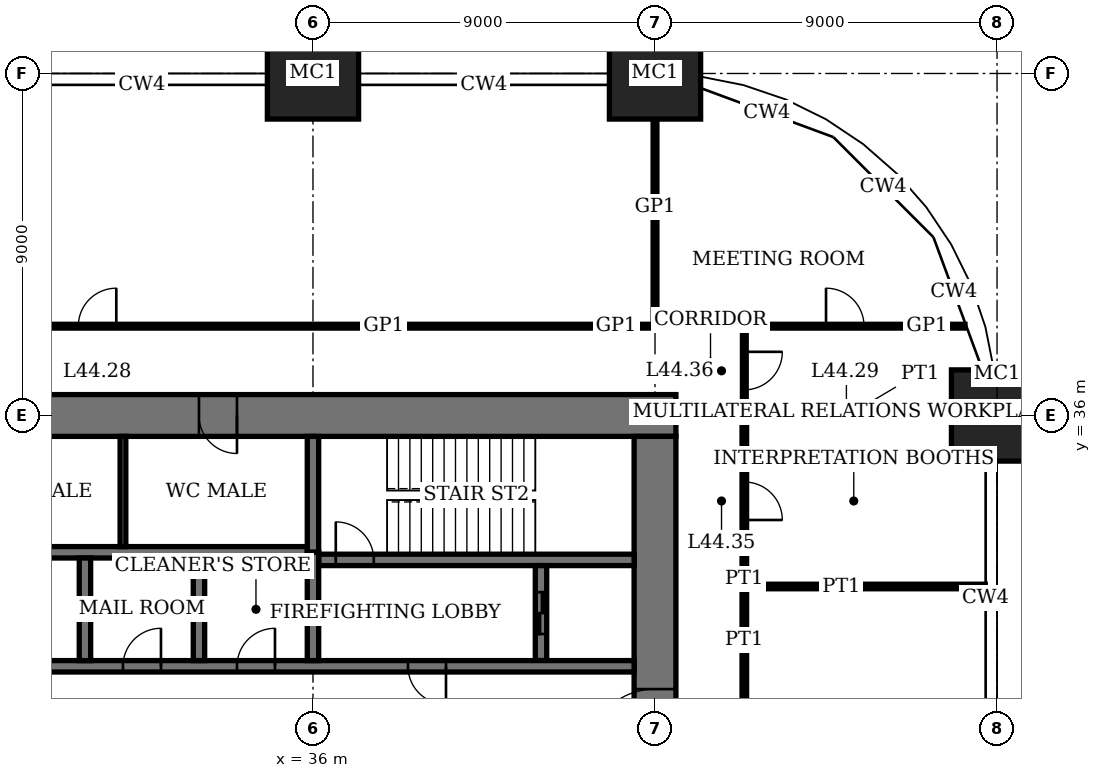
"""IFC4 building model, lengths in metres.
Left out: names, types, materials, properties, quantities, classifications, styles, units other than length and angle.
Written with IfcOpenShell. Run it as: python <this file> out.ifc"""

import sys

from ifc_helpers import new_model, si_unit, direction, frame, frame_2d, origin, origin_2d, place, context, subcontext, project, spatial, rectangle, extrude, element, fill, save


model = new_model("IFC4")
c1 = context("Model", 3, precision=1e-05, world=origin(), true_north=direction((0.0, 1.0)))
c2 = subcontext(c1, "Body", "Model", "MODEL_VIEW")
j1 = project(units=[si_unit("LENGTHUNIT", "METRE"), si_unit("PLANEANGLEUNIT", "RADIAN")], contexts=[c1])
p1 = place(None, origin())
s1 = spatial("IfcSite", under=j1, at=p1, CompositionType="ELEMENT")
p2 = place(p1, origin())
s2 = spatial("IfcBuilding", under=s1, at=p2, CompositionType="ELEMENT")
p3 = place(p2, frame((0.0, 0.0, 182.2)))
s3 = spatial("IfcBuildingStorey", under=s2, at=p3, CompositionType="ELEMENT", Elevation=182.2)
for number, where, z_axis, x_axis in (
    (1, (36.0, 45.0, 0.0), (0.0, 0.0, 1.0), (1.0, 0.0, 0.0)),
    (2, (45.0, 45.0, 0.0), (0.0, 0.0, 1.0), (1.0, 0.0, 0.0)),
    (3, (54.0, 36.0, 0.0), (0.0, 0.0, 1.0), (1.0, 0.0, 0.0)),
):
    element("IfcColumn", number, at=place(p3, frame(where, z_axis=z_axis, x_axis=x_axis)), inside=s3, PredefinedType="COLUMN", context=c2, shape_type="SweptSolid", body=[
        extrude(rectangle(XDim=2.4, YDim=2.4, at=origin_2d()), origin(), (0.0, 0.0, 1.0), 4.0),
    ])
p4 = place(p3, frame((45.55, 36.0, 0.0), z_axis=(0.0, 0.0, 1.0), x_axis=(-1.0, 0.0, 0.0)))
e4 = element("IfcWall", 4, at=p4, inside=s3, PredefinedType="SHEAR", context=c2, shape_type="SweptSolid", body=[
    extrude(rectangle(XDim=28.1, YDim=1.1, at=frame_2d((14.05, 0.0))), origin(), (0.0, 0.0, 1.0), 4.0),
])
p5 = place(p4, frame((11.55, 0.0, 0.0)))
e5 = element("IfcOpeningElement", 5, at=p5, cuts=e4, PredefinedType="OPENING", context=c2, shape_type="SweptSolid", body=[
    extrude(rectangle(XDim=1.0, YDim=2.4, at=frame_2d((0.5, 1.2))), frame((0.0, 0.56, 0.0), z_axis=(0.0, -1.0, 0.0), x_axis=(1.0, 0.0, 0.0)), (0.0, 0.0, 1.0), 1.12),
])
p6 = place(p4, frame((16.55, 0.0, 0.0)))
e6 = element("IfcOpeningElement", 6, at=p6, cuts=e4, PredefinedType="OPENING", context=c2, shape_type="SweptSolid", body=[
    extrude(rectangle(XDim=1.0, YDim=2.4, at=frame_2d((0.5, 1.2))), frame((0.0, 0.56, 0.0), z_axis=(0.0, -1.0, 0.0), x_axis=(1.0, 0.0, 0.0)), (0.0, 0.0, 1.0), 1.12),
])
p7 = place(p4, frame((20.0, 0.0, 0.0)))
e7 = element("IfcOpeningElement", 7, at=p7, cuts=e4, PredefinedType="OPENING", context=c2, shape_type="SweptSolid", body=[
    extrude(rectangle(XDim=1.1, YDim=2.4, at=frame_2d((0.55, 1.2))), frame((0.0, 0.56, 0.0), z_axis=(0.0, -1.0, 0.0), x_axis=(1.0, 0.0, 0.0)), (0.0, 0.0, 1.0), 1.12),
])
p8 = place(p4, frame((24.05, 0.0, 0.0)))
e8 = element("IfcOpeningElement", 8, at=p8, cuts=e4, PredefinedType="OPENING", context=c2, shape_type="SweptSolid", body=[
    extrude(rectangle(XDim=1.0, YDim=2.4, at=frame_2d((0.5, 1.2))), frame((0.0, 0.56, 0.0), z_axis=(0.0, -1.0, 0.0), x_axis=(1.0, 0.0, 0.0)), (0.0, 0.0, 1.0), 1.12),
])
p9 = place(p3, frame((45.0, 18.55, 0.0), z_axis=(0.0, 0.0, 1.0), x_axis=(0.0, 1.0, 0.0)))
e9 = element("IfcWall", 9, at=p9, inside=s3, PredefinedType="SHEAR", context=c2, shape_type="SweptSolid", body=[
    extrude(rectangle(XDim=16.9, YDim=1.1, at=frame_2d((8.45, 0.0))), origin(), (0.0, 0.0, 1.0), 4.0),
])
p10 = place(p9, frame((8.45, 0.0, 0.0)))
e10 = element("IfcOpeningElement", 10, at=p10, cuts=e9, PredefinedType="OPENING", context=c2, shape_type="SweptSolid", body=[
    extrude(rectangle(XDim=1.8, YDim=2.4, at=frame_2d((0.9, 1.2))), frame((0.0, 0.56, 0.0), z_axis=(0.0, -1.0, 0.0), x_axis=(1.0, 0.0, 0.0)), (0.0, 0.0, 1.0), 1.12),
])
p11 = place(p3, frame((36.15, 32.2, 0.0), z_axis=(0.0, 0.0, 1.0), x_axis=(1.0, 0.0, 0.0)))
e11 = element("IfcWall", 11, at=p11, inside=s3, PredefinedType="SHEAR", context=c2, shape_type="SweptSolid", body=[
    extrude(rectangle(XDim=8.3, YDim=0.3, at=frame_2d((4.15, 0.0))), origin(), (0.0, 0.0, 1.0), 4.0),
])
p12 = place(p11, frame((0.45, 0.0, 0.0)))
e12 = element("IfcOpeningElement", 12, at=p12, cuts=e11, PredefinedType="OPENING", context=c2, shape_type="SweptSolid", body=[
    extrude(rectangle(XDim=1.0, YDim=2.4, at=frame_2d((0.5, 1.2))), frame((0.0, 0.16, 0.0), z_axis=(0.0, -1.0, 0.0), x_axis=(1.0, 0.0, 0.0)), (0.0, 0.0, 1.0), 0.32),
])
p13 = place(p3, frame((36.0, 32.4, 0.0), z_axis=(0.0, 0.0, 1.0), x_axis=(0.0, 1.0, 0.0)))
e13 = element("IfcWall", 13, at=p13, inside=s3, PredefinedType="SHEAR", context=c2, shape_type="SweptSolid", body=[
    extrude(rectangle(XDim=3.05, YDim=0.3, at=frame_2d((1.525, 0.0))), origin(), (0.0, 0.0, 1.0), 4.0),
])
p14 = place(p3, frame((42.0, 29.55, 0.0), z_axis=(0.0, 0.0, 1.0), x_axis=(0.0, 1.0, 0.0)))
e14 = element("IfcWall", 14, at=p14, inside=s3, PredefinedType="SHEAR", context=c2, shape_type="SweptSolid", body=[
    extrude(rectangle(XDim=2.5, YDim=0.3, at=frame_2d((1.25, 0.0))), origin(), (0.0, 0.0, 1.0), 4.0),
])
p15 = place(p14, frame((0.7, 0.0, 0.0)))
e15 = element("IfcOpeningElement", 15, at=p15, cuts=e14, PredefinedType="OPENING", context=c2, shape_type="SweptSolid", body=[
    extrude(rectangle(XDim=1.1, YDim=2.4, at=frame_2d((0.55, 1.2))), frame((0.0, 0.16, 0.0), z_axis=(0.0, -1.0, 0.0), x_axis=(1.0, 0.0, 0.0)), (0.0, 0.0, 1.0), 0.32),
])
p16 = place(p3, frame((18.55, 29.4, 0.0), z_axis=(0.0, 0.0, 1.0), x_axis=(1.0, 0.0, 0.0)))
e16 = element("IfcWall", 16, at=p16, inside=s3, PredefinedType="SHEAR", context=c2, shape_type="SweptSolid", body=[
    extrude(rectangle(XDim=25.9, YDim=0.3, at=frame_2d((12.95, 0.0))), origin(), (0.0, 0.0, 1.0), 4.0),
])
p17 = place(p16, frame((19.95, 0.0, 0.0)))
e17 = element("IfcOpeningElement", 17, at=p17, cuts=e16, PredefinedType="OPENING", context=c2, shape_type="SweptSolid", body=[
    extrude(rectangle(XDim=1.0, YDim=2.4, at=frame_2d((0.5, 1.2))), frame((0.0, 0.16, 0.0), z_axis=(0.0, -1.0, 0.0), x_axis=(1.0, 0.0, 0.0)), (0.0, 0.0, 1.0), 0.32),
])
p18 = place(p16, frame((0.5, 0.0, 0.0)))
e18 = element("IfcOpeningElement", 18, at=p18, cuts=e16, PredefinedType="OPENING", context=c2, shape_type="SweptSolid", body=[
    extrude(rectangle(XDim=0.9, YDim=2.1, at=frame_2d((0.45, 1.05))), frame((0.0, 0.16, 0.0), z_axis=(0.0, -1.0, 0.0), x_axis=(1.0, 0.0, 0.0)), (0.0, 0.0, 1.0), 0.32),
])
p19 = place(p16, frame((15.45, 0.0, 0.0)))
e19 = element("IfcOpeningElement", 19, at=p19, cuts=e16, PredefinedType="OPENING", context=c2, shape_type="SweptSolid", body=[
    extrude(rectangle(XDim=1.0, YDim=2.4, at=frame_2d((0.5, 1.2))), frame((0.0, 0.16, 0.0), z_axis=(0.0, -1.0, 0.0), x_axis=(1.0, 0.0, 0.0)), (0.0, 0.0, 1.0), 0.32),
])
p20 = place(p16, frame((12.45, 0.0, 0.0)))
e20 = element("IfcOpeningElement", 20, at=p20, cuts=e16, PredefinedType="OPENING", context=c2, shape_type="SweptSolid", body=[
    extrude(rectangle(XDim=1.0, YDim=2.4, at=frame_2d((0.5, 1.2))), frame((0.0, 0.16, 0.0), z_axis=(0.0, -1.0, 0.0), x_axis=(1.0, 0.0, 0.0)), (0.0, 0.0, 1.0), 0.32),
])
p21 = place(p16, frame((9.4, 0.0, 0.0)))
e21 = element("IfcOpeningElement", 21, at=p21, cuts=e16, PredefinedType="OPENING", context=c2, shape_type="SweptSolid", body=[
    extrude(rectangle(XDim=1.1, YDim=2.4, at=frame_2d((0.55, 1.2))), frame((0.0, 0.16, 0.0), z_axis=(0.0, -1.0, 0.0), x_axis=(1.0, 0.0, 0.0)), (0.0, 0.0, 1.0), 0.32),
])
p22 = place(p16, frame((6.4, 0.0, 0.0)))
e22 = element("IfcOpeningElement", 22, at=p22, cuts=e16, PredefinedType="OPENING", context=c2, shape_type="SweptSolid", body=[
    extrude(rectangle(XDim=1.1, YDim=2.4, at=frame_2d((0.55, 1.2))), frame((0.0, 0.16, 0.0), z_axis=(0.0, -1.0, 0.0), x_axis=(1.0, 0.0, 0.0)), (0.0, 0.0, 1.0), 0.32),
])
p23 = place(p16, frame((3.3, 0.0, 0.0)))
e23 = element("IfcOpeningElement", 23, at=p23, cuts=e16, PredefinedType="OPENING", context=c2, shape_type="SweptSolid", body=[
    extrude(rectangle(XDim=1.3, YDim=2.4, at=frame_2d((0.65, 1.2))), frame((0.0, 0.16, 0.0), z_axis=(0.0, -1.0, 0.0), x_axis=(1.0, 0.0, 0.0)), (0.0, 0.0, 1.0), 0.32),
])
p24 = place(p3, frame((18.55, 32.4, 0.0), z_axis=(0.0, 0.0, 1.0), x_axis=(1.0, 0.0, 0.0)))
e24 = element("IfcWall", 24, at=p24, inside=s3, PredefinedType="SHEAR", context=c2, shape_type="SweptSolid", body=[
    extrude(rectangle(XDim=17.3, YDim=0.3, at=frame_2d((8.65, 0.0))), origin(), (0.0, 0.0, 1.0), 4.0),
])
for number, where, z_axis, x_axis in (
    (25, (33.0, 29.55, 0.0), (0.0, 0.0, 1.0), (0.0, 1.0, 0.0)),
    (26, (30.0, 29.55, 0.0), (0.0, 0.0, 1.0), (0.0, 1.0, 0.0)),
):
    element("IfcWall", number, at=place(p3, frame(where, z_axis=z_axis, x_axis=x_axis)), inside=s3, PredefinedType="SHEAR", context=c2, shape_type="SweptSolid", body=[
        extrude(rectangle(XDim=2.7, YDim=0.3, at=frame_2d((1.35, 0.0))), origin(), (0.0, 0.0, 1.0), 4.0),
    ])
p25 = place(p3, frame((36.0, 29.55, 0.0), z_axis=(0.0, 0.0, 1.0), x_axis=(0.0, 1.0, 0.0)))
e27 = element("IfcWall", 27, at=p25, inside=s3, PredefinedType="SHEAR", context=c2, shape_type="SweptSolid", body=[
    extrude(rectangle(XDim=2.85, YDim=0.3, at=frame_2d((1.425, 0.0))), origin(), (0.0, 0.0, 1.0), 4.0),
])
p26 = place(p3, frame((47.35, 31.5, 0.0), z_axis=(0.0, 0.0, 1.0), x_axis=(1.0, 0.0, 0.0)))
e28 = element("IfcWall", 28, at=p26, inside=s3, PredefinedType="PARTITIONING", context=c2, shape_type="SweptSolid", body=[
    extrude(rectangle(XDim=6.34, YDim=0.12, at=frame_2d((3.17, 0.0))), origin(), (0.0, 0.0, 1.0), 3.1),
])
p27 = place(p3, frame((47.35, 36.0, 0.0), z_axis=(0.0, 0.0, 1.0), x_axis=(1.0, 0.0, 0.0)))
e29 = element("IfcWall", 29, at=p27, inside=s3, PredefinedType="PARTITIONING", context=c2, shape_type="SweptSolid", body=[
    extrude(rectangle(XDim=5.45, YDim=0.12, at=frame_2d((2.725, 0.0))), origin(), (0.0, 0.0, 1.0), 3.05),
])
p28 = place(p3, frame((15.65, 38.35, 0.0), z_axis=(0.0, 0.0, 1.0), x_axis=(1.0, 0.0, 0.0)))
e30 = element("IfcWall", 30, at=p28, inside=s3, PredefinedType="PARTITIONING", context=c2, shape_type="SweptSolid", body=[
    extrude(rectangle(XDim=29.35, YDim=0.1, at=frame_2d((14.675, 0.0))), origin(), (0.0, 0.0, 1.0), 3.75),
])
p29 = place(p28, frame((14.175, 0.0, 0.0)))
e31 = element("IfcOpeningElement", 31, at=p29, cuts=e30, PredefinedType="OPENING", context=c2, shape_type="SweptSolid", body=[
    extrude(rectangle(XDim=1.0, YDim=2.4, at=frame_2d((0.5, 1.2))), frame((0.0, 0.06, 0.0), z_axis=(0.0, -1.0, 0.0), x_axis=(1.0, 0.0, 0.0)), (0.0, 0.0, 1.0), 0.12),
])
p30 = place(p3, frame((45.0, 38.35, 0.0), z_axis=(0.0, 0.0, 1.0), x_axis=(1.0, 0.0, 0.0)))
e32 = element("IfcWall", 32, at=p30, inside=s3, PredefinedType="PARTITIONING", context=c2, shape_type="SweptSolid", body=[
    extrude(rectangle(XDim=2.35, YDim=0.1, at=frame_2d((1.175, 0.0))), origin(), (0.0, 0.0, 1.0), 3.75),
])
p31 = place(p3, frame((47.35, 38.35, 0.0), z_axis=(0.0, 0.0, 1.0), x_axis=(1.0, 0.0, 0.0)))
e33 = element("IfcWall", 33, at=p31, inside=s3, PredefinedType="PARTITIONING", context=c2, shape_type="SweptSolid", body=[
    extrude(rectangle(XDim=5.806, YDim=0.1, at=frame_2d((2.903, 0.0))), origin(), (0.0, 0.0, 1.0), 3.75),
])
p32 = place(p31, frame((2.15, 0.0, 0.0)))
e34 = element("IfcOpeningElement", 34, at=p32, cuts=e33, PredefinedType="OPENING", context=c2, shape_type="SweptSolid", body=[
    extrude(rectangle(XDim=1.0, YDim=2.4, at=frame_2d((0.5, 1.2))), frame((0.0, 0.06, 0.0), z_axis=(0.0, -1.0, 0.0), x_axis=(1.0, 0.0, 0.0)), (0.0, 0.0, 1.0), 0.12),
])
p33 = place(p3, frame((45.0, 38.35, 0.0), z_axis=(0.0, 0.0, 1.0), x_axis=(0.0, 1.0, 0.0)))
e35 = element("IfcWall", 35, at=p33, inside=s3, PredefinedType="PARTITIONING", context=c2, shape_type="SweptSolid", body=[
    extrude(rectangle(XDim=5.45, YDim=0.1, at=frame_2d((2.725, 0.0))), origin(), (0.0, 0.0, 1.0), 3.05),
])
p34 = place(p3, frame((47.35, 22.5, 0.0), z_axis=(0.0, 0.0, 1.0), x_axis=(0.0, 1.0, 0.0)))
e36 = element("IfcWall", 36, at=p34, inside=s3, PredefinedType="PARTITIONING", context=c2, shape_type="SweptSolid", body=[
    extrude(rectangle(XDim=9.0, YDim=0.12, at=frame_2d((4.5, 0.0))), origin(), (0.0, 0.0, 1.0), 3.75),
])
p35 = place(p34, frame((4.0, 0.0, 0.0)))
e37 = element("IfcOpeningElement", 37, at=p35, cuts=e36, PredefinedType="OPENING", context=c2, shape_type="SweptSolid", body=[
    extrude(rectangle(XDim=1.0, YDim=2.4, at=frame_2d((0.5, 1.2))), frame((0.0, 0.07, 0.0), z_axis=(0.0, -1.0, 0.0), x_axis=(1.0, 0.0, 0.0)), (0.0, 0.0, 1.0), 0.14),
])
p36 = place(p3, frame((47.35, 31.5, 0.0), z_axis=(0.0, 0.0, 1.0), x_axis=(0.0, 1.0, 0.0)))
e38 = element("IfcWall", 38, at=p36, inside=s3, PredefinedType="PARTITIONING", context=c2, shape_type="SweptSolid", body=[
    extrude(rectangle(XDim=4.5, YDim=0.12, at=frame_2d((2.25, 0.0))), origin(), (0.0, 0.0, 1.0), 3.75),
])
p37 = place(p36, frame((1.75, 0.0, 0.0)))
e39 = element("IfcOpeningElement", 39, at=p37, cuts=e38, PredefinedType="OPENING", context=c2, shape_type="SweptSolid", body=[
    extrude(rectangle(XDim=1.0, YDim=2.4, at=frame_2d((0.5, 1.2))), frame((0.0, 0.07, 0.0), z_axis=(0.0, -1.0, 0.0), x_axis=(1.0, 0.0, 0.0)), (0.0, 0.0, 1.0), 0.14),
])
p38 = place(p3, frame((47.35, 36.0, 0.0), z_axis=(0.0, 0.0, 1.0), x_axis=(0.0, 1.0, 0.0)))
e40 = element("IfcWall", 40, at=p38, inside=s3, PredefinedType="PARTITIONING", context=c2, shape_type="SweptSolid", body=[
    extrude(rectangle(XDim=2.35, YDim=0.1, at=frame_2d((1.175, 0.0))), origin(), (0.0, 0.0, 1.0), 3.75),
])
p39 = place(p38, frame((0.675, 0.0, 0.0)))
e41 = element("IfcOpeningElement", 41, at=p39, cuts=e40, PredefinedType="OPENING", context=c2, shape_type="SweptSolid", body=[
    extrude(rectangle(XDim=1.0, YDim=2.4, at=frame_2d((0.5, 1.2))), frame((0.0, 0.06, 0.0), z_axis=(0.0, -1.0, 0.0), x_axis=(1.0, 0.0, 0.0)), (0.0, 0.0, 1.0), 0.12),
])
p40 = place(p3, frame((31.0, 32.55, 0.0), z_axis=(0.0, 0.0, 1.0), x_axis=(0.0, 1.0, 0.0)))
e42 = element("IfcWall", 42, at=p40, inside=s3, PredefinedType="PARTITIONING", context=c2, shape_type="SweptSolid", body=[
    extrude(rectangle(XDim=2.9, YDim=0.15, at=frame_2d((1.45, 0.0))), origin(), (0.0, 0.0, 1.0), 3.75),
])
p41 = place(p10, origin())
e43 = element("IfcDoor", 43, at=p41, inside=s3, OperationType="DOUBLE_DOOR_DOUBLE_SWING", PredefinedType="DOOR", context=c2, shape_type="SweptSolid", body=[
    extrude(rectangle(XDim=1.8, YDim=2.4, at=frame_2d((0.9, 1.2))), frame((0.0, 0.03, 0.0), z_axis=(0.0, -1.0, 0.0), x_axis=(1.0, 0.0, 0.0)), (0.0, 0.0, 1.0), 0.06),
    extrude(rectangle(XDim=0.04, YDim=2.4, at=frame_2d((0.02, 1.2))), frame((0.0, 0.55, 0.0), z_axis=(0.0, -1.0, 0.0), x_axis=(1.0, 0.0, 0.0)), (0.0, 0.0, 1.0), 1.1),
    extrude(rectangle(XDim=0.04, YDim=2.4, at=frame_2d((1.78, 1.2))), frame((0.0, 0.55, 0.0), z_axis=(0.0, -1.0, 0.0), x_axis=(1.0, 0.0, 0.0)), (0.0, 0.0, 1.0), 1.1),
    extrude(rectangle(XDim=1.8, YDim=0.04, at=frame_2d((0.9, 2.38))), frame((0.0, 0.55, 0.0), z_axis=(0.0, -1.0, 0.0), x_axis=(1.0, 0.0, 0.0)), (0.0, 0.0, 1.0), 1.1),
])
fill(e10, e43)
p42 = place(p5, origin())
e44 = element("IfcDoor", 44, at=p42, inside=s3, OperationType="SINGLE_SWING_RIGHT", PredefinedType="DOOR", context=c2, shape_type="SweptSolid", body=[
    extrude(rectangle(XDim=1.0, YDim=2.4, at=frame_2d((0.5, 1.2))), frame((0.0, 0.025, 0.0), z_axis=(0.0, -1.0, 0.0), x_axis=(1.0, 0.0, 0.0)), (0.0, 0.0, 1.0), 0.05),
    extrude(rectangle(XDim=0.04, YDim=2.4, at=frame_2d((0.02, 1.2))), frame((0.0, 0.4, 0.0), z_axis=(0.0, -1.0, 0.0), x_axis=(1.0, 0.0, 0.0)), (0.0, 0.0, 1.0), 0.8),
    extrude(rectangle(XDim=0.04, YDim=2.4, at=frame_2d((0.98, 1.2))), frame((0.0, 0.4, 0.0), z_axis=(0.0, -1.0, 0.0), x_axis=(1.0, 0.0, 0.0)), (0.0, 0.0, 1.0), 0.8),
    extrude(rectangle(XDim=1.0, YDim=0.04, at=frame_2d((0.5, 2.38))), frame((0.0, 0.4, 0.0), z_axis=(0.0, -1.0, 0.0), x_axis=(1.0, 0.0, 0.0)), (0.0, 0.0, 1.0), 0.8),
])
fill(e5, e44)
p43 = place(p12, origin())
e45 = element("IfcDoor", 45, at=p43, inside=s3, OperationType="SINGLE_SWING_RIGHT", PredefinedType="DOOR", context=c2, shape_type="SweptSolid", body=[
    extrude(rectangle(XDim=1.0, YDim=2.4, at=frame_2d((0.5, 1.2))), frame((0.0, 0.03, 0.0), z_axis=(0.0, -1.0, 0.0), x_axis=(1.0, 0.0, 0.0)), (0.0, 0.0, 1.0), 0.06),
])
fill(e12, e45)
p44 = place(p17, origin())
e46 = element("IfcDoor", 46, at=p44, inside=s3, OperationType="SINGLE_SWING_RIGHT", PredefinedType="DOOR", context=c2, shape_type="SweptSolid", body=[
    extrude(rectangle(XDim=1.0, YDim=2.4, at=frame_2d((0.5, 1.2))), frame((0.0, 0.03, 0.0), z_axis=(0.0, -1.0, 0.0), x_axis=(1.0, 0.0, 0.0)), (0.0, 0.0, 1.0), 0.06),
])
fill(e17, e46)
p45 = place(p29, origin())
e47 = element("IfcDoor", 47, at=p45, inside=s3, OperationType="SINGLE_SWING_LEFT", PredefinedType="DOOR", context=c2, shape_type="SweptSolid", body=[
    extrude(rectangle(XDim=1.0, YDim=2.4, at=frame_2d((0.5, 1.2))), frame((0.0, 0.02, 0.0), z_axis=(0.0, -1.0, 0.0), x_axis=(1.0, 0.0, 0.0)), (0.0, 0.0, 1.0), 0.04),
])
fill(e31, e47)
p46 = place(p32, origin())
e48 = element("IfcDoor", 48, at=p46, inside=s3, OperationType="SINGLE_SWING_RIGHT", PredefinedType="DOOR", context=c2, shape_type="SweptSolid", body=[
    extrude(rectangle(XDim=1.0, YDim=2.4, at=frame_2d((0.5, 1.2))), frame((0.0, 0.02, 0.0), z_axis=(0.0, -1.0, 0.0), x_axis=(1.0, 0.0, 0.0)), (0.0, 0.0, 1.0), 0.04),
])
fill(e34, e48)
p47 = place(p37, origin())
e49 = element("IfcDoor", 49, at=p47, inside=s3, OperationType="SINGLE_SWING_LEFT", PredefinedType="DOOR", context=c2, shape_type="SweptSolid", body=[
    extrude(rectangle(XDim=1.0, YDim=2.4, at=frame_2d((0.5, 1.2))), frame((0.0, 0.025, 0.0), z_axis=(0.0, -1.0, 0.0), x_axis=(1.0, 0.0, 0.0)), (0.0, 0.0, 1.0), 0.05),
])
fill(e39, e49)
p48 = place(p39, origin())
e50 = element("IfcDoor", 50, at=p48, inside=s3, OperationType="SINGLE_SWING_RIGHT", PredefinedType="DOOR", context=c2, shape_type="SweptSolid", body=[
    extrude(rectangle(XDim=1.0, YDim=2.4, at=frame_2d((0.5, 1.2))), frame((0.0, 0.02, 0.0), z_axis=(0.0, -1.0, 0.0), x_axis=(1.0, 0.0, 0.0)), (0.0, 0.0, 1.0), 0.04),
])
fill(e41, e50)
p49 = place(p19, origin())
e51 = element("IfcDoor", 51, at=p49, inside=s3, OperationType="SINGLE_SWING_LEFT", PredefinedType="DOOR", context=c2, shape_type="SweptSolid", body=[
    extrude(rectangle(XDim=1.0, YDim=2.4, at=frame_2d((0.5, 1.2))), frame((0.0, 0.03, 0.0), z_axis=(0.0, -1.0, 0.0), x_axis=(1.0, 0.0, 0.0)), (0.0, 0.0, 1.0), 0.06),
])
fill(e19, e51)
p50 = place(p20, origin())
e52 = element("IfcDoor", 52, at=p50, inside=s3, OperationType="SINGLE_SWING_LEFT", PredefinedType="DOOR", context=c2, shape_type="SweptSolid", body=[
    extrude(rectangle(XDim=1.0, YDim=2.4, at=frame_2d((0.5, 1.2))), frame((0.0, 0.03, 0.0), z_axis=(0.0, -1.0, 0.0), x_axis=(1.0, 0.0, 0.0)), (0.0, 0.0, 1.0), 0.06),
])
fill(e20, e52)
p51 = place(p15, origin())
e53 = element("IfcDoor", 53, at=p51, inside=s3, OperationType="DOUBLE_DOOR_SLIDING", PredefinedType="DOOR", context=c2, shape_type="SweptSolid", body=[
    extrude(rectangle(XDim=1.1, YDim=2.4, at=frame_2d((0.55, 1.2))), frame((0.0, 0.03, 0.0), z_axis=(0.0, -1.0, 0.0), x_axis=(1.0, 0.0, 0.0)), (0.0, 0.0, 1.0), 0.06),
])
fill(e15, e53)
save(model, sys.argv[1])
